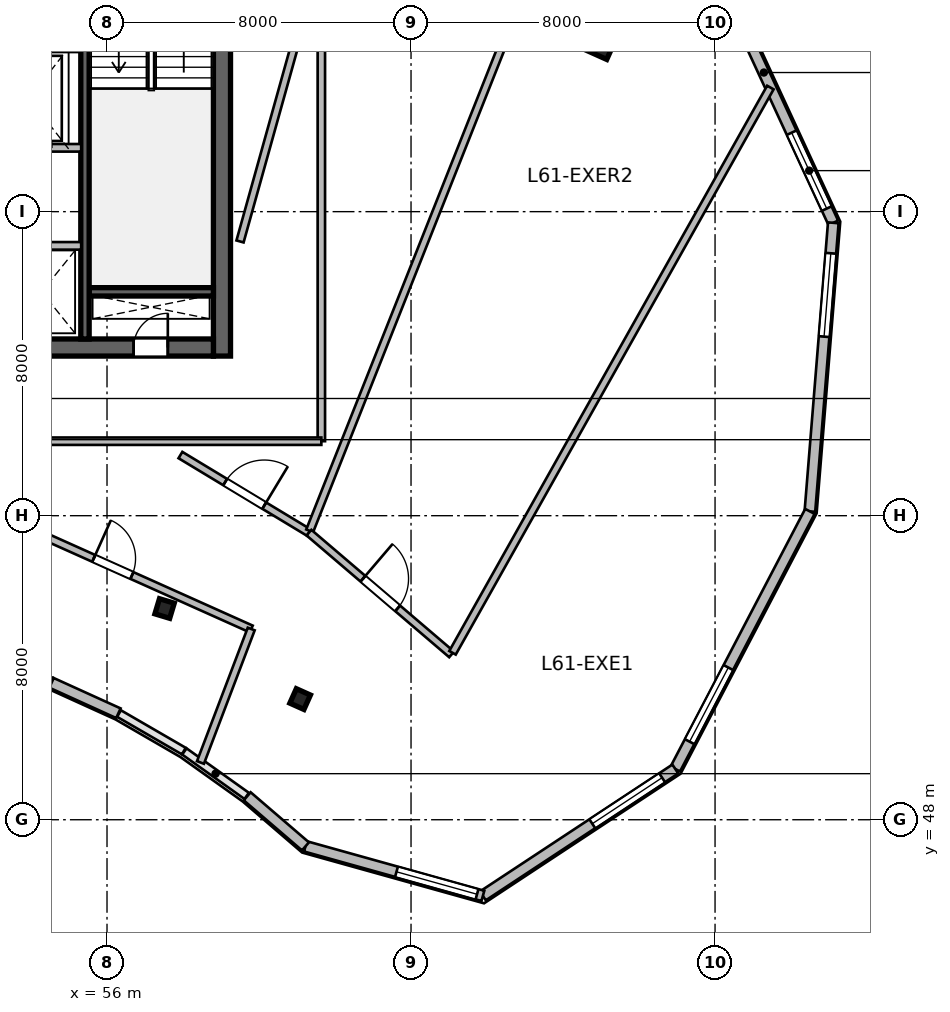
"""IFC4 building model, lengths in metres.
Left out: names, types, materials, properties, quantities, classifications, styles, units other than length and angle.
Written with IfcOpenShell. Run it as: python <this file> out.ifc"""

import sys

from ifc_helpers import new_model, si_unit, direction, frame, frame_2d, origin, origin_2d, place, context, subcontext, project, spatial, rectangle, i_section, extrude, source, transform, mapped, element, fill, save


model = new_model("IFC4")
c1 = context("Model", 3, precision=1e-05, world=origin(), true_north=direction((0.0, 1.0)))
c2 = subcontext(c1, "Body", "Model", "MODEL_VIEW")
j1 = project(units=[si_unit("LENGTHUNIT", "METRE"), si_unit("PLANEANGLEUNIT", "RADIAN")], contexts=[c1])
p1 = place(None, origin())
s1 = spatial("IfcSite", under=j1, at=p1, CompositionType="ELEMENT")
p2 = place(p1, origin())
s2 = spatial("IfcBuilding", under=s1, at=p2, CompositionType="ELEMENT")
p3 = place(p2, frame((0.0, 0.0, 250.8)))
s3 = spatial("IfcBuildingStorey", under=s2, at=p3, CompositionType="ELEMENT", Elevation=250.8)
m1 = source(origin(), c2, "Body", "SweptSolid", [
    extrude(rectangle(XDim=12.0, YDim=0.45, at=frame_2d((6.0, 0.0))), origin(), (0.0, 0.0, 1.0), 3.9),
])
p4 = place(p3, frame((59.025, 60.2, 0.0), z_axis=(0.0, 0.0, 1.0), x_axis=(0.0, 1.0, 0.0)))
e1 = element("IfcWall", 1, at=p4, inside=s3, PredefinedType="SHEAR", context=c2, shape_type="MappedRepresentation", body=[
    mapped(m1, transform((0.0, 0.0, 0.0), scale=1.0)),
])
m2 = source(origin(), c2, "Body", "SweptSolid", [
    extrude(rectangle(XDim=21.6, YDim=0.45, at=frame_2d((10.8, 0.0))), origin(), (0.0, 0.0, 1.0), 3.9),
])
p5 = place(p3, frame((37.2, 60.425, 0.0), z_axis=(0.0, 0.0, 1.0), x_axis=(1.0, 0.0, 0.0)))
e2 = element("IfcWall", 2, at=p5, inside=s3, PredefinedType="SHEAR", context=c2, shape_type="MappedRepresentation", body=[
    mapped(m2, transform((0.0, 0.0, 0.0), scale=1.0)),
])
p6 = place(p5, frame((1.1, 0.0, 0.0)))
e3 = element("IfcOpeningElement", 3, at=p6, cuts=e2, PredefinedType="OPENING", context=c2, shape_type="SweptSolid", body=[
    extrude(rectangle(XDim=1.15, YDim=2.15, at=frame_2d((0.575, 1.075))), frame((0.0, 0.235, 0.0), z_axis=(0.0, -1.0, 0.0), x_axis=(1.0, 0.0, 0.0)), (0.0, 0.0, 1.0), 0.47),
])
p7 = place(p5, frame((19.5, 0.0, 0.0)))
e4 = element("IfcOpeningElement", 4, at=p7, cuts=e2, PredefinedType="OPENING", context=c2, shape_type="SweptSolid", body=[
    extrude(rectangle(XDim=0.9, YDim=2.1, at=frame_2d((0.45, 1.05))), frame((0.0, 0.235, 0.0), z_axis=(0.0, -1.0, 0.0), x_axis=(1.0, 0.0, 0.0)), (0.0, 0.0, 1.0), 0.47),
])
p8 = place(p5, frame((12.02, 0.0, 0.0)))
e5 = element("IfcOpeningElement", 5, at=p8, cuts=e2, PredefinedType="OPENING", context=c2, shape_type="SweptSolid", body=[
    extrude(rectangle(XDim=1.6, YDim=2.15, at=frame_2d((0.8, 1.075))), frame((0.0, 0.235, 0.0), z_axis=(0.0, -1.0, 0.0), x_axis=(1.0, 0.0, 0.0)), (0.0, 0.0, 1.0), 0.47),
])
m3 = source(origin(), c2, "Body", "SweptSolid", [
    extrude(rectangle(XDim=3.27, YDim=0.22, at=frame_2d((1.635, 0.0))), origin(), (0.0, 0.0, 1.0), 3.9),
])
p9 = place(p3, frame((55.53, 61.89, 0.0), z_axis=(0.0, 0.0, 1.0), x_axis=(1.0, 0.0, 0.0)))
e6 = element("IfcWall", 6, at=p9, inside=s3, PredefinedType="SHEAR", context=c2, shape_type="MappedRepresentation", body=[
    mapped(m3, transform((0.0, 0.0, 0.0), scale=1.0)),
])
m4 = source(origin(), c2, "Body", "SweptSolid", [
    extrude(rectangle(XDim=11.1, YDim=0.22, at=frame_2d((5.55, 0.0))), origin(), (0.0, 0.0, 1.0), 3.9),
])
p10 = place(p3, frame((55.42, 60.65, 0.0), z_axis=(0.0, 0.0, 1.0), x_axis=(0.0, 1.0, 0.0)))
e7 = element("IfcWall", 7, at=p10, inside=s3, PredefinedType="SHEAR", context=c2, shape_type="MappedRepresentation", body=[
    mapped(m4, transform((0.0, 0.0, 0.0), scale=1.0)),
])
p11 = place(p10, frame((9.595, 0.0, 0.0)))
e8 = element("IfcOpeningElement", 8, at=p11, cuts=e7, PredefinedType="OPENING", context=c2, shape_type="SweptSolid", body=[
    extrude(rectangle(XDim=1.15, YDim=2.15, at=frame_2d((0.575, 1.075))), frame((0.0, 0.12, 0.0), z_axis=(0.0, -1.0, 0.0), x_axis=(1.0, 0.0, 0.0)), (0.0, 0.0, 1.0), 0.24),
])
m5 = source(origin(), c2, "Body", "SweptSolid", [
    extrude(i_section(OverallWidth=0.406, OverallDepth=0.416, WebThickness=0.03, FlangeThickness=0.048, at=origin_2d()), origin(), (0.0, 0.0, 1.0), 3.9),
])
for number, where, z_axis, x_axis in (
    (9, (57.515, 53.558, 0.0), (0.0, 0.0, 1.0), (0.289, 0.957, 0.0)),
    (10, (61.082, 51.175, 0.0), (0.0, 0.0, 1.0), (0.409, 0.912, 0.0)),
):
    element("IfcColumn", number, at=place(p3, frame(where, z_axis=z_axis, x_axis=x_axis)), inside=s3, PredefinedType="COLUMN", context=c2, shape_type="MappedRepresentation", body=[
        mapped(m5, transform((0.0, 0.0, 0.0), scale=1.0)),
    ])
m6 = source(origin(), c2, "Body", "SweptSolid", [
    extrude(rectangle(XDim=0.95, YDim=0.95, at=origin_2d()), origin(), (0.0, 0.0, 1.0), 3.9),
])
p12 = place(p3, frame((68.91, 68.633, 0.0), z_axis=(0.0, 0.0, 1.0), x_axis=(0.409126902895, 0.912477494148, 0.0)))
e11 = element("IfcColumn", 11, at=p12, inside=s3, PredefinedType="COLUMN", context=c2, shape_type="MappedRepresentation", body=[
    mapped(m6, transform((0.0, 0.0, 0.0), scale=1.0)),
])
m7 = source(origin(), c2, "Body", "SweptSolid", [
    extrude(rectangle(XDim=6.05, YDim=0.28, at=frame_2d((3.025, 0.0))), origin(), (0.0, 0.0, 1.0), 3.58),
])
p13 = place(p3, frame((72.574, 69.198, 0.0), z_axis=(0.0, 0.0, 1.0), x_axis=(0.41942922905, -0.907788037935, 0.0)))
e12 = element("IfcWall", 12, at=p13, inside=s3, PredefinedType="SOLIDWALL", context=c2, shape_type="MappedRepresentation", body=[
    mapped(m7, transform((0.0, 0.0, 0.0), scale=1.0)),
])
p14 = place(p13, frame((3.437, 0.0, 0.95)))
e13 = element("IfcOpeningElement", 13, at=p14, cuts=e12, PredefinedType="OPENING", context=c2, shape_type="SweptSolid", body=[
    extrude(rectangle(XDim=2.2, YDim=2.1, at=frame_2d((1.1, 1.05))), frame((0.0, 0.15, 0.0), z_axis=(0.0, -1.0, 0.0), x_axis=(1.0, 0.0, 0.0)), (0.0, 0.0, 1.0), 0.3),
])
m8 = source(origin(), c2, "Body", "SweptSolid", [
    extrude(rectangle(XDim=7.618, YDim=0.28, at=frame_2d((3.809, 0.0))), origin(), (0.0, 0.0, 1.0), 3.58),
])
p15 = place(p3, frame((75.112, 63.707, 0.0), z_axis=(0.0, 0.0, 1.0), x_axis=(-0.080820171031, -0.996728699273, 0.0)))
e14 = element("IfcWall", 14, at=p15, inside=s3, PredefinedType="SOLIDWALL", context=c2, shape_type="MappedRepresentation", body=[
    mapped(m8, transform((0.0, 0.0, 0.0), scale=1.0)),
])
p16 = place(p15, frame((0.805, 0.0, 0.95)))
e15 = element("IfcOpeningElement", 15, at=p16, cuts=e14, PredefinedType="OPENING", context=c2, shape_type="SweptSolid", body=[
    extrude(rectangle(XDim=2.2, YDim=2.1, at=frame_2d((1.1, 1.05))), frame((0.0, 0.15, 0.0), z_axis=(0.0, -1.0, 0.0), x_axis=(1.0, 0.0, 0.0)), (0.0, 0.0, 1.0), 0.3),
])
m9 = source(origin(), c2, "Body", "SweptSolid", [
    extrude(rectangle(XDim=7.648, YDim=0.28, at=frame_2d((3.824, 0.0))), origin(), (0.0, 0.0, 1.0), 3.58),
])
p17 = place(p3, frame((74.496, 56.113, 0.0), z_axis=(0.0, 0.0, 1.0), x_axis=(-0.463116873665, -0.886297219519, 0.0)))
e16 = element("IfcWall", 16, at=p17, inside=s3, PredefinedType="SOLIDWALL", context=c2, shape_type="MappedRepresentation", body=[
    mapped(m9, transform((0.0, 0.0, 0.0), scale=1.0)),
])
p18 = place(p17, frame((4.636, 0.0, 0.95)))
e17 = element("IfcOpeningElement", 17, at=p18, cuts=e16, PredefinedType="OPENING", context=c2, shape_type="SweptSolid", body=[
    extrude(rectangle(XDim=2.2, YDim=2.1, at=frame_2d((1.1, 1.05))), frame((0.0, 0.15, 0.0), z_axis=(0.0, -1.0, 0.0), x_axis=(1.0, 0.0, 0.0)), (0.0, 0.0, 1.0), 0.3),
])
m10 = source(origin(), c2, "Body", "SweptSolid", [
    extrude(rectangle(XDim=6.065, YDim=0.28, at=frame_2d((3.033, 0.0))), origin(), (0.0, 0.0, 1.0), 3.58),
])
p19 = place(p3, frame((70.954, 49.335, 0.0), z_axis=(0.0, 0.0, 1.0), x_axis=(-0.834857303202, -0.550466423399, 0.0)))
e18 = element("IfcWall", 18, at=p19, inside=s3, PredefinedType="SOLIDWALL", context=c2, shape_type="MappedRepresentation", body=[
    mapped(m10, transform((0.0, 0.0, 0.0), scale=1.0)),
])
p20 = place(p19, frame((0.416, 0.0, 0.95)))
e19 = element("IfcOpeningElement", 19, at=p20, cuts=e18, PredefinedType="OPENING", context=c2, shape_type="SweptSolid", body=[
    extrude(rectangle(XDim=2.2, YDim=2.1, at=frame_2d((1.1, 1.05))), frame((0.0, 0.15, 0.0), z_axis=(0.0, -1.0, 0.0), x_axis=(1.0, 0.0, 0.0)), (0.0, 0.0, 1.0), 0.3),
])
m11 = source(origin(), c2, "Body", "SweptSolid", [
    extrude(rectangle(XDim=4.847, YDim=0.28, at=frame_2d((2.424, 0.0))), origin(), (0.0, 0.0, 1.0), 3.58),
])
p21 = place(p3, frame((65.891, 45.996, 0.0), z_axis=(0.0, 0.0, 1.0), x_axis=(-0.963208430762, 0.268755500238, 0.0)))
e20 = element("IfcWall", 20, at=p21, inside=s3, PredefinedType="SOLIDWALL", context=c2, shape_type="MappedRepresentation", body=[
    mapped(m11, transform((0.0, 0.0, 0.0), scale=1.0)),
])
p22 = place(p21, frame((0.16, 0.0, 0.95)))
e21 = element("IfcOpeningElement", 21, at=p22, cuts=e20, PredefinedType="OPENING", context=c2, shape_type="SweptSolid", body=[
    extrude(rectangle(XDim=2.2, YDim=2.1, at=frame_2d((1.1, 1.05))), frame((0.0, 0.15, 0.0), z_axis=(0.0, -1.0, 0.0), x_axis=(1.0, 0.0, 0.0)), (0.0, 0.0, 1.0), 0.3),
])
m12 = source(origin(), c2, "Body", "SweptSolid", [
    extrude(rectangle(XDim=2.022, YDim=0.28, at=frame_2d((1.011, 0.0))), origin(), (0.0, 0.0, 1.0), 3.58),
])
p23 = place(p3, frame((61.222, 47.299, 0.0), z_axis=(0.0, 0.0, 1.0), x_axis=(-0.758343943716, 0.651854633358, 0.0)))
e22 = element("IfcWall", 22, at=p23, inside=s3, PredefinedType="SOLIDWALL", context=c2, shape_type="MappedRepresentation", body=[
    mapped(m12, transform((0.0, 0.0, 0.0), scale=1.0)),
])
m13 = source(origin(), c2, "Body", "SweptSolid", [
    extrude(rectangle(XDim=1.933, YDim=0.28, at=frame_2d((0.966, 0.0))), origin(), (0.0, 0.0, 1.0), 3.58),
])
p24 = place(p3, frame((56.3, 50.802, 0.0), z_axis=(0.0, 0.0, 1.0), x_axis=(-0.910478916145, 0.413555489936, 0.0)))
e23 = element("IfcWall", 23, at=p24, inside=s3, PredefinedType="SOLIDWALL", context=c2, shape_type="MappedRepresentation", body=[
    mapped(m13, transform((0.0, 0.0, 0.0), scale=1.0)),
])
m14 = source(origin(), c2, "Body", "SweptSolid", [
    extrude(rectangle(XDim=1.901, YDim=0.28, at=frame_2d((0.951, 0.0))), origin(), (0.0, 0.0, 1.0), 3.58),
])
p25 = place(p3, frame((54.523, 51.608, 0.0), z_axis=(0.0, 0.0, 1.0), x_axis=(-0.94793587841, 0.318461254194, 0.0)))
e24 = element("IfcWall", 24, at=p25, inside=s3, PredefinedType="SOLIDWALL", context=c2, shape_type="MappedRepresentation", body=[
    mapped(m14, transform((0.0, 0.0, 0.0), scale=1.0)),
])
m15 = source(origin(), c2, "Body", "SweptSolid", [
    extrude(rectangle(XDim=5.62, YDim=0.2, at=frame_2d((2.81, 0.0))), origin(), (0.0, 0.0, 1.0), 3.58),
])
p26 = place(p3, frame((49.7, 65.68, 0.0), z_axis=(0.0, 0.0, 1.0), x_axis=(1.0, 0.0, 0.0)))
e25 = element("IfcWall", 25, at=p26, inside=s3, PredefinedType="SOLIDWALL", context=c2, shape_type="MappedRepresentation", body=[
    mapped(m15, transform((0.0, 0.0, 0.0), scale=1.0)),
])
m16 = source(origin(), c2, "Body", "SweptSolid", [
    extrude(rectangle(XDim=4.1, YDim=0.2, at=frame_2d((2.05, 0.0))), origin(), (0.0, 0.0, 1.0), 3.58),
])
p27 = place(p3, frame((51.22, 63.1, 0.0), z_axis=(0.0, 0.0, 1.0), x_axis=(1.0, 0.0, 0.0)))
e26 = element("IfcWall", 26, at=p27, inside=s3, PredefinedType="SOLIDWALL", context=c2, shape_type="MappedRepresentation", body=[
    mapped(m16, transform((0.0, 0.0, 0.0), scale=1.0)),
])
m17 = source(origin(), c2, "Body", "SweptSolid", [
    extrude(rectangle(XDim=7.982, YDim=0.195, at=frame_2d((3.991, 0.0))), origin(), (0.0, 0.0, 1.0), 3.58),
])
p28 = place(p3, frame((52.511, 56.284, 0.0), z_axis=(0.0, 0.0, 1.0), x_axis=(0.91248609472, -0.409107720464, 0.0)))
e27 = element("IfcWall", 27, at=p28, inside=s3, PredefinedType="PARTITIONING", context=c2, shape_type="MappedRepresentation", body=[
    mapped(m17, transform((0.0, 0.0, 0.0), scale=1.0)),
])
p29 = place(p28, frame((3.441, 0.0, 0.0)))
e28 = element("IfcOpeningElement", 28, at=p29, cuts=e27, PredefinedType="OPENING", context=c2, shape_type="SweptSolid", body=[
    extrude(rectangle(XDim=1.1, YDim=2.15, at=frame_2d((0.55, 1.075))), frame((0.0, 0.107, 0.0), z_axis=(0.0, -1.0, 0.0), x_axis=(1.0, 0.0, 0.0)), (0.0, 0.0, 1.0), 0.215),
])
m18 = source(origin(), c2, "Body", "SweptSolid", [
    extrude(rectangle(XDim=3.757, YDim=0.195, at=frame_2d((1.879, 0.0))), origin(), (0.0, 0.0, 1.0), 3.58),
])
p30 = place(p3, frame((58.459, 49.507, 0.0), z_axis=(0.0, 0.0, 1.0), x_axis=(0.355427833237, 0.93470372598, 0.0)))
e29 = element("IfcWall", 29, at=p30, inside=s3, PredefinedType="PARTITIONING", context=c2, shape_type="MappedRepresentation", body=[
    mapped(m18, transform((0.0, 0.0, 0.0), scale=1.0)),
])
m19 = source(origin(), c2, "Body", "SweptSolid", [
    extrude(rectangle(XDim=3.951, YDim=0.195, at=frame_2d((1.975, 0.0))), origin(), (0.0, 0.0, 1.0), 3.58),
])
p31 = place(p3, frame((57.932, 57.596, 0.0), z_axis=(0.0, 0.0, 1.0), x_axis=(0.856137696849, -0.51674775668, 0.0)))
e30 = element("IfcWall", 30, at=p31, inside=s3, PredefinedType="PARTITIONING", context=c2, shape_type="MappedRepresentation", body=[
    mapped(m19, transform((0.0, 0.0, 0.0), scale=1.0)),
])
p32 = place(p31, frame((1.375, 0.0, 0.0)))
e31 = element("IfcOpeningElement", 31, at=p32, cuts=e30, PredefinedType="OPENING", context=c2, shape_type="SweptSolid", body=[
    extrude(rectangle(XDim=1.2, YDim=2.15, at=frame_2d((0.6, 1.075))), frame((0.0, 0.107, 0.0), z_axis=(0.0, -1.0, 0.0), x_axis=(1.0, 0.0, 0.0)), (0.0, 0.0, 1.0), 0.215),
])
m20 = source(origin(), c2, "Body", "SweptSolid", [
    extrude(rectangle(XDim=13.161, YDim=0.195, at=frame_2d((6.581, 0.0))), origin(), (0.0, 0.0, 1.0), 3.58),
])
p33 = place(p3, frame((59.5, 63.216, 0.0), z_axis=(0.0, 0.0, 1.0), x_axis=(0.268752541286, 0.963209256368, 0.0)))
e32 = element("IfcWall", 32, at=p33, inside=s3, PredefinedType="PARTITIONING", context=c2, shape_type="MappedRepresentation", body=[
    mapped(m20, transform((0.0, 0.0, 0.0), scale=1.0)),
])
m21 = source(origin(), c2, "Body", "SweptSolid", [
    extrude(rectangle(XDim=18.471, YDim=0.195, at=frame_2d((9.235, 0.0))), origin(), (0.0, 0.0, 1.0), 3.58),
])
p34 = place(p3, frame((61.333, 55.602, 0.0), z_axis=(0.0, 0.0, 1.0), x_axis=(0.368827756565, 0.929497760076, 0.0)))
e33 = element("IfcWall", 33, at=p34, inside=s3, PredefinedType="PARTITIONING", context=c2, shape_type="MappedRepresentation", body=[
    mapped(m21, transform((0.0, 0.0, 0.0), scale=1.0)),
])
m22 = source(origin(), c2, "Body", "SweptSolid", [
    extrude(rectangle(XDim=4.935, YDim=0.195, at=frame_2d((2.467, 0.0))), origin(), (0.0, 0.0, 1.0), 3.58),
])
p35 = place(p3, frame((61.314, 55.554, 0.0), z_axis=(0.0, 0.0, 1.0), x_axis=(0.760547222161, -0.649282621716, 0.0)))
e34 = element("IfcWall", 34, at=p35, inside=s3, PredefinedType="PARTITIONING", context=c2, shape_type="MappedRepresentation", body=[
    mapped(m22, transform((0.0, 0.0, 0.0), scale=1.0)),
])
p36 = place(p35, frame((1.867, 0.0, 0.0)))
e35 = element("IfcOpeningElement", 35, at=p36, cuts=e34, PredefinedType="OPENING", context=c2, shape_type="SweptSolid", body=[
    extrude(rectangle(XDim=1.2, YDim=2.15, at=frame_2d((0.6, 1.075))), frame((0.0, 0.107, 0.0), z_axis=(0.0, -1.0, 0.0), x_axis=(1.0, 0.0, 0.0)), (0.0, 0.0, 1.0), 0.215),
])
m23 = source(origin(), c2, "Body", "SweptSolid", [
    extrude(rectangle(XDim=17.064, YDim=0.195, at=frame_2d((8.532, 0.0))), origin(), (0.0, 0.0, 1.0), 3.58),
])
p37 = place(p3, frame((65.092, 52.393, 0.0), z_axis=(0.0, 0.0, 1.0), x_axis=(0.490167496501, 0.871628261, 0.0)))
e36 = element("IfcWall", 36, at=p37, inside=s3, PredefinedType="PARTITIONING", context=c2, shape_type="MappedRepresentation", body=[
    mapped(m23, transform((0.0, 0.0, 0.0), scale=1.0)),
])
m24 = source(origin(), c2, "Body", "SweptSolid", [
    extrude(rectangle(XDim=18.567, YDim=0.195, at=frame_2d((9.284, 0.0))), origin(), (0.0, 0.0, 1.0), 3.58),
])
p38 = place(p3, frame((61.64, 57.96, 0.0), z_axis=(0.0, 0.0, 1.0), x_axis=(0.0, 1.0, 0.0)))
e37 = element("IfcWall", 37, at=p38, inside=s3, PredefinedType="PARTITIONING", context=c2, shape_type="MappedRepresentation", body=[
    mapped(m24, transform((0.0, 0.0, 0.0), scale=1.0)),
])
m25 = source(origin(), c2, "Body", "SweptSolid", [
    extrude(rectangle(XDim=12.39, YDim=0.195, at=frame_2d((6.195, 0.0))), origin(), (0.0, 0.0, 1.0), 3.58),
])
p39 = place(p3, frame((49.25, 57.96, 0.0), z_axis=(0.0, 0.0, 1.0), x_axis=(1.0, 0.0, 0.0)))
e38 = element("IfcWall", 38, at=p39, inside=s3, PredefinedType="PARTITIONING", context=c2, shape_type="MappedRepresentation", body=[
    mapped(m25, transform((0.0, 0.0, 0.0), scale=1.0)),
])
m26 = source(origin(), c2, "Body", "SweptSolid", [
    extrude(rectangle(XDim=2.2, YDim=2.1, at=frame_2d((1.1, 1.05))), frame((0.0, 0.03, 0.0), z_axis=(0.0, -1.0, 0.0), x_axis=(1.0, 0.0, 0.0)), (0.0, 0.0, 1.0), 0.06),
])
p40 = place(p14, origin())
e39 = element("IfcWindow", 39, at=p40, inside=s3, PartitioningType="TRIPLE_PANEL_VERTICAL", PredefinedType="WINDOW", context=c2, shape_type="MappedRepresentation", body=[
    mapped(m26, transform((0.0, 0.0, 0.0), scale=1.0)),
])
fill(e13, e39)
p41 = place(p16, origin())
e40 = element("IfcWindow", 40, at=p41, inside=s3, PartitioningType="TRIPLE_PANEL_VERTICAL", PredefinedType="WINDOW", context=c2, shape_type="MappedRepresentation", body=[
    mapped(m26, transform((0.0, 0.0, 0.0), scale=1.0)),
])
fill(e15, e40)
p42 = place(p18, origin())
e41 = element("IfcWindow", 41, at=p42, inside=s3, PartitioningType="TRIPLE_PANEL_VERTICAL", PredefinedType="WINDOW", context=c2, shape_type="MappedRepresentation", body=[
    mapped(m26, transform((0.0, 0.0, 0.0), scale=1.0)),
])
fill(e17, e41)
p43 = place(p20, origin())
e42 = element("IfcWindow", 42, at=p43, inside=s3, PartitioningType="TRIPLE_PANEL_VERTICAL", PredefinedType="WINDOW", context=c2, shape_type="MappedRepresentation", body=[
    mapped(m26, transform((0.0, 0.0, 0.0), scale=1.0)),
])
fill(e19, e42)
p44 = place(p22, origin())
e43 = element("IfcWindow", 43, at=p44, inside=s3, PartitioningType="TRIPLE_PANEL_VERTICAL", PredefinedType="WINDOW", context=c2, shape_type="MappedRepresentation", body=[
    mapped(m26, transform((0.0, 0.0, 0.0), scale=1.0)),
])
fill(e21, e43)
m27 = source(origin(), c2, "Body", "SweptSolid", [
    extrude(rectangle(XDim=0.9, YDim=2.1, at=frame_2d((0.45, 1.05))), frame((0.0, 0.025, 0.0), z_axis=(0.0, -1.0, 0.0), x_axis=(1.0, 0.0, 0.0)), (0.0, 0.0, 1.0), 0.05),
])
p45 = place(p7, origin())
e44 = element("IfcDoor", 44, at=p45, inside=s3, OperationType="SINGLE_SWING_RIGHT", PredefinedType="DOOR", context=c2, shape_type="MappedRepresentation", body=[
    mapped(m27, transform((0.0, 0.0, 0.0), scale=1.0)),
])
fill(e4, e44)
m28 = source(origin(), c2, "Body", "SweptSolid", [
    extrude(rectangle(XDim=1.1, YDim=2.15, at=frame_2d((0.55, 1.075))), frame((0.0, 0.025, 0.0), z_axis=(0.0, -1.0, 0.0), x_axis=(1.0, 0.0, 0.0)), (0.0, 0.0, 1.0), 0.05),
])
p46 = place(p29, origin())
e45 = element("IfcDoor", 45, at=p46, inside=s3, OperationType="SINGLE_SWING_LEFT", PredefinedType="DOOR", context=c2, shape_type="MappedRepresentation", body=[
    mapped(m28, transform((0.0, 0.0, 0.0), scale=1.0)),
])
fill(e28, e45)
m29 = source(origin(), c2, "Body", "SweptSolid", [
    extrude(rectangle(XDim=1.2, YDim=2.15, at=frame_2d((0.6, 1.075))), frame((0.0, 0.025, 0.0), z_axis=(0.0, -1.0, 0.0), x_axis=(1.0, 0.0, 0.0)), (0.0, 0.0, 1.0), 0.05),
])
p47 = place(p32, origin())
e46 = element("IfcDoor", 46, at=p47, inside=s3, OperationType="SINGLE_SWING_RIGHT", PredefinedType="DOOR", context=c2, shape_type="MappedRepresentation", body=[
    mapped(m29, transform((0.0, 0.0, 0.0), scale=1.0)),
])
fill(e31, e46)
p48 = place(p36, origin())
e47 = element("IfcDoor", 47, at=p48, inside=s3, OperationType="SINGLE_SWING_LEFT", PredefinedType="DOOR", context=c2, shape_type="MappedRepresentation", body=[
    mapped(m29, transform((0.0, 0.0, 0.0), scale=1.0)),
])
fill(e35, e47)
save(model, sys.argv[1])
